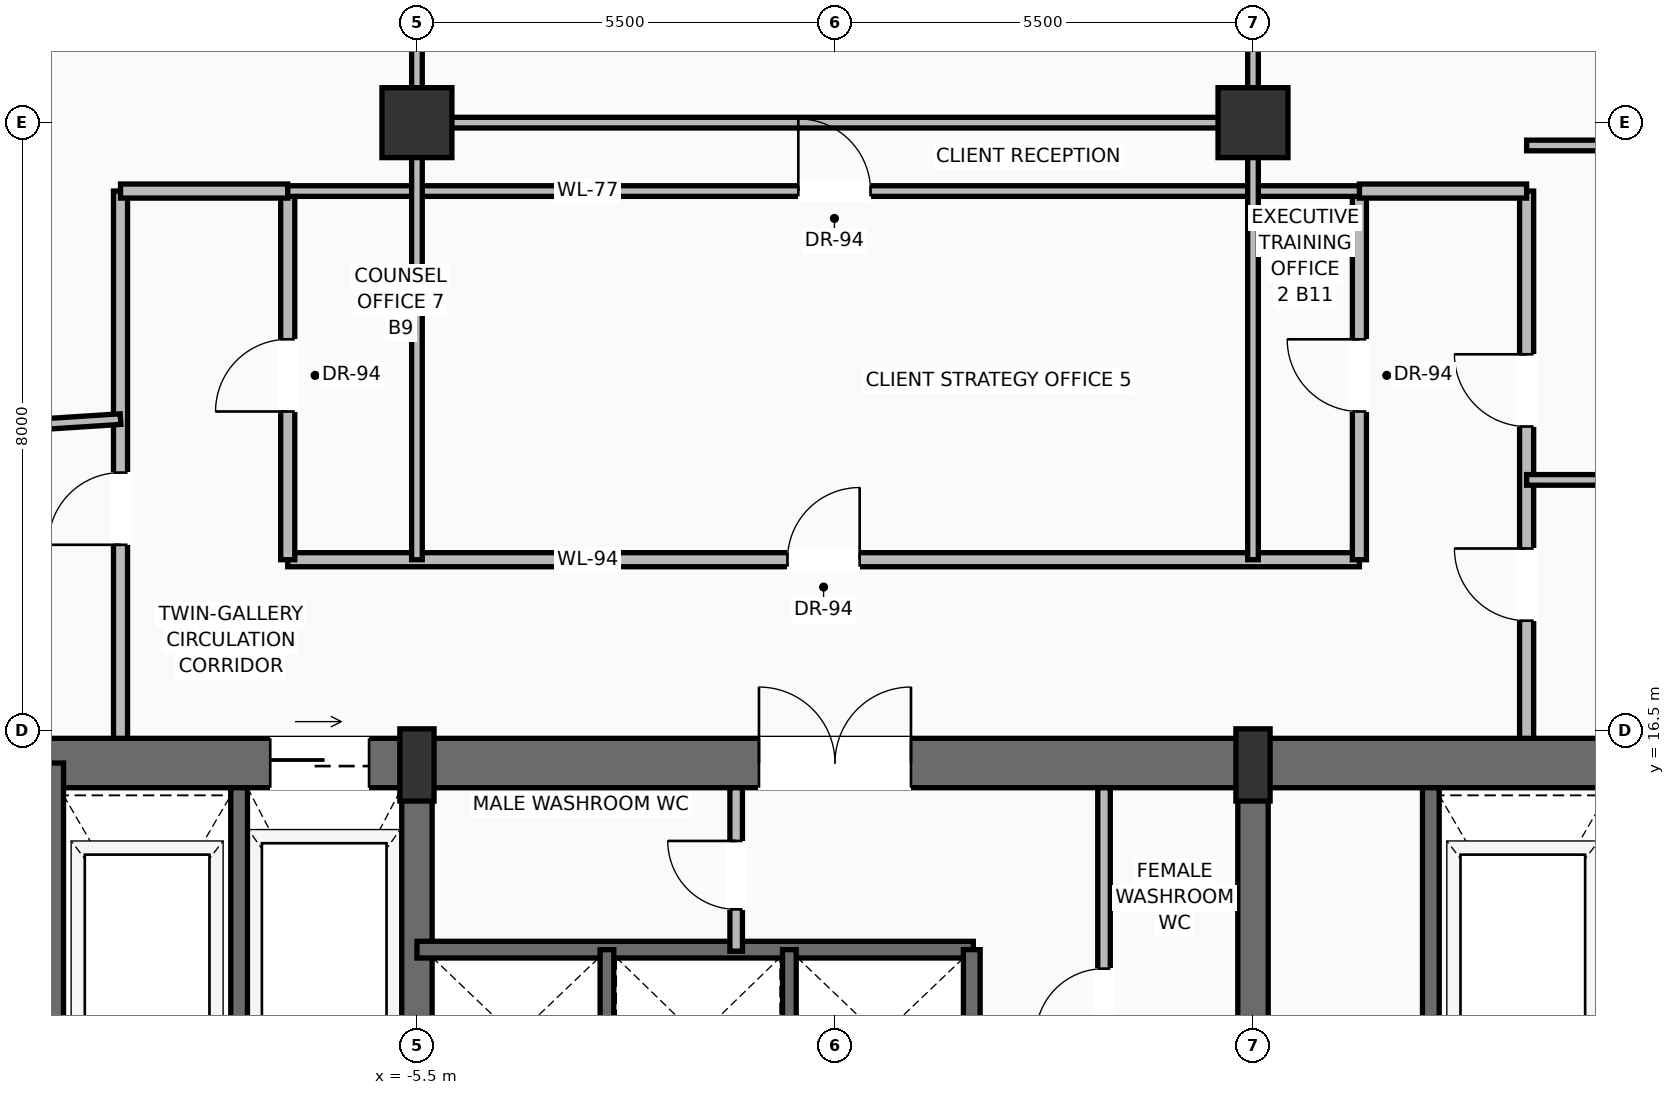
"""IFC4 building model, lengths in metres.
Left out: names, types, materials, properties, quantities, classifications, styles, units other than length and angle.
Written with IfcOpenShell. Run it as: python <this file> out.ifc"""

import sys

from ifc_helpers import new_model, si_unit, direction, frame, frame_2d, origin, origin_2d, place, context, subcontext, project, spatial, rectangle, extrude, source, transform, mapped, element, fill, save


model = new_model("IFC4")
c1 = context("Model", 3, precision=1e-05, world=origin(), true_north=direction((0.0, 1.0)))
c2 = subcontext(c1, "Body", "Model", "MODEL_VIEW")
j1 = project(units=[si_unit("LENGTHUNIT", "METRE"), si_unit("PLANEANGLEUNIT", "RADIAN")], contexts=[c1])
p1 = place(None, origin())
s1 = spatial("IfcSite", under=j1, at=p1, CompositionType="ELEMENT")
p2 = place(p1, origin())
s2 = spatial("IfcBuilding", under=s1, at=p2, CompositionType="ELEMENT")
p3 = place(p2, frame((0.0, 0.0, 144.1)))
s3 = spatial("IfcBuildingStorey", under=s2, at=p3, CompositionType="ELEMENT", Elevation=144.1)
p4 = place(p3, frame((-10.8, 16.075, 0.0), z_axis=(0.0, 0.0, 1.0), x_axis=(1.0, 0.0, 0.0)))
e1 = element("IfcWall", 1, at=p4, inside=s3, PredefinedType="SHEAR", context=c2, shape_type="SweptSolid", body=[
    extrude(rectangle(XDim=21.6, YDim=0.65, at=frame_2d((10.8, 0.0))), origin(), (0.0, 0.0, 1.0), 3.47),
])
p5 = place(p4, frame((3.37, 0.0, 0.0)))
e2 = element("IfcOpeningElement", 2, at=p5, cuts=e1, PredefinedType="OPENING", context=c2, shape_type="SweptSolid", body=[
    extrude(rectangle(XDim=1.3, YDim=2.3, at=frame_2d((0.65, 1.15))), frame((0.0, 0.335, 0.0), z_axis=(0.0, -1.0, 0.0), x_axis=(1.0, 0.0, 0.0)), (0.0, 0.0, 1.0), 0.67),
])
p6 = place(p4, frame((9.8, 0.0, 0.0)))
e3 = element("IfcOpeningElement", 3, at=p6, cuts=e1, PredefinedType="OPENING", context=c2, shape_type="SweptSolid", body=[
    extrude(rectangle(XDim=2.0, YDim=2.4, at=frame_2d((1.0, 1.2))), frame((0.0, 0.335, 0.0), z_axis=(0.0, -1.0, 0.0), x_axis=(1.0, 0.0, 0.0)), (0.0, 0.0, 1.0), 0.67),
])
p7 = place(p3, frame((-10.475, 0.525, 0.0), z_axis=(0.0, 0.0, 1.0), x_axis=(0.0, 1.0, 0.0)))
e4 = element("IfcWall", 4, at=p7, inside=s3, PredefinedType="SHEAR", context=c2, shape_type="SweptSolid", body=[
    extrude(rectangle(XDim=15.55, YDim=0.65, at=frame_2d((7.775, 0.0))), origin(), (0.0, 0.0, 1.0), 3.47),
])
p8 = place(p3, frame((-5.5, 0.525, 0.0), z_axis=(0.0, 0.0, 1.0), x_axis=(0.0, 1.0, 0.0)))
e5 = element("IfcWall", 5, at=p8, inside=s3, PredefinedType="SHEAR", context=c2, shape_type="SweptSolid", body=[
    extrude(rectangle(XDim=15.55, YDim=0.4, at=frame_2d((7.775, 0.0))), origin(), (0.0, 0.0, 1.0), 3.47),
])
p9 = place(p8, frame((8.975, 0.0, 0.0)))
e6 = element("IfcOpeningElement", 6, at=p9, cuts=e5, PredefinedType="OPENING", context=c2, shape_type="SweptSolid", body=[
    extrude(rectangle(XDim=1.1, YDim=2.2, at=frame_2d((0.55, 1.1))), frame((0.0, 0.21, 0.0), z_axis=(0.0, -1.0, 0.0), x_axis=(1.0, 0.0, 0.0)), (0.0, 0.0, 1.0), 0.42),
])
p10 = place(p3, frame((5.5, 0.525, 0.0), z_axis=(0.0, 0.0, 1.0), x_axis=(0.0, 1.0, 0.0)))
e7 = element("IfcWall", 7, at=p10, inside=s3, PredefinedType="SHEAR", context=c2, shape_type="SweptSolid", body=[
    extrude(rectangle(XDim=15.55, YDim=0.4, at=frame_2d((7.775, 0.0))), origin(), (0.0, 0.0, 1.0), 3.47),
])
p11 = place(p10, frame((8.975, 0.0, 0.0)))
e8 = element("IfcOpeningElement", 8, at=p11, cuts=e7, PredefinedType="OPENING", context=c2, shape_type="SweptSolid", body=[
    extrude(rectangle(XDim=1.1, YDim=2.2, at=frame_2d((0.55, 1.1))), frame((0.0, 0.21, 0.0), z_axis=(0.0, -1.0, 0.0), x_axis=(1.0, 0.0, 0.0)), (0.0, 0.0, 1.0), 0.42),
])
m1 = source(origin(), c2, "Body", "SweptSolid", [
    extrude(rectangle(XDim=0.45, YDim=0.95, at=origin_2d()), origin(), (0.0, 0.0, 1.0), 3.7),
])
for number, where, z_axis, x_axis in (
    (9, (-5.5, 16.05, 0.0), (0.0, 0.0, 1.0), (1.0, 0.0, 0.0)),
    (10, (5.5, 16.05, 0.0), (0.0, 0.0, 1.0), (1.0, 0.0, 0.0)),
):
    element("IfcColumn", number, at=place(p3, frame(where, z_axis=z_axis, x_axis=x_axis)), inside=s3, PredefinedType="PILASTER", context=c2, shape_type="MappedRepresentation", body=[
        mapped(m1, transform((0.0, 0.0, 0.0), scale=1.0)),
    ])
m2 = source(origin(), c2, "Body", "SweptSolid", [
    extrude(rectangle(XDim=0.92, YDim=0.92, at=origin_2d()), origin(), (0.0, 0.0, 1.0), 3.7),
])
for number, where, z_axis, x_axis in (
    (11, (-5.5, 24.5, 0.0), (0.0, 0.0, 1.0), (1.0, 0.0, 0.0)),
    (12, (5.5, 24.5, 0.0), (0.0, 0.0, 1.0), (1.0, 0.0, 0.0)),
):
    element("IfcColumn", number, at=place(p3, frame(where, z_axis=z_axis, x_axis=x_axis)), inside=s3, PredefinedType="COLUMN", context=c2, shape_type="MappedRepresentation", body=[
        mapped(m2, transform((0.0, 0.0, 0.0), scale=1.0)),
    ])
for number, where, z_axis, x_axis in (
    (13, (-7.84, 11.87, 0.0), (0.0, 0.0, 1.0), (0.0, 1.0, 0.0)),
    (14, (7.84, 11.87, 0.0), (0.0, 0.0, 1.0), (0.0, 1.0, 0.0)),
):
    element("IfcWall", number, at=place(p3, frame(where, z_axis=z_axis, x_axis=x_axis)), inside=s3, PredefinedType="SOLIDWALL", context=c2, shape_type="SweptSolid", body=[
        extrude(rectangle(XDim=3.88, YDim=0.22, at=frame_2d((1.94, 0.0))), origin(), (0.0, 0.0, 1.0), 3.47),
    ])
p12 = place(p3, frame((-5.5, 13.62, 0.0), z_axis=(0.0, 0.0, 1.0), x_axis=(1.0, 0.0, 0.0)))
e15 = element("IfcWall", 15, at=p12, inside=s3, PredefinedType="SOLIDWALL", context=c2, shape_type="SweptSolid", body=[
    extrude(rectangle(XDim=7.32, YDim=0.22, at=frame_2d((3.66, 0.0))), origin(), (0.0, 0.0, 1.0), 3.47),
])
p13 = place(p3, frame((1.8, 11.32, 0.0), z_axis=(0.0, 0.0, 1.0), x_axis=(0.0, 1.0, 0.0)))
e16 = element("IfcWall", 16, at=p13, inside=s3, PredefinedType="SOLIDWALL", context=c2, shape_type="SweptSolid", body=[
    extrude(rectangle(XDim=2.3, YDim=0.22, at=frame_2d((1.15, 0.0))), origin(), (0.0, 0.0, 1.0), 3.47),
])
for number, where, z_axis, x_axis in (
    (17, (-3.0, 11.32, 0.0), (0.0, 0.0, 1.0), (0.0, 1.0, 0.0)),
    (18, (-0.6, 11.32, 0.0), (0.0, 0.0, 1.0), (0.0, 1.0, 0.0)),
):
    element("IfcWall", number, at=place(p3, frame(where, z_axis=z_axis, x_axis=x_axis)), inside=s3, PredefinedType="SOLIDWALL", context=c2, shape_type="SweptSolid", body=[
        extrude(rectangle(XDim=2.3, YDim=0.18, at=frame_2d((1.15, 0.0))), origin(), (0.0, 0.0, 1.0), 3.47),
    ])
p14 = place(p3, frame((-1.3, 13.6, 0.0), z_axis=(0.0, 0.0, 1.0), x_axis=(0.0, 1.0, 0.0)))
e19 = element("IfcWall", 19, at=p14, inside=s3, PredefinedType="PARTITIONING", context=c2, shape_type="SweptSolid", body=[
    extrude(rectangle(XDim=2.15, YDim=0.165, at=frame_2d((1.075, 0.0))), origin(), (0.0, 0.0, 1.0), 3.462),
])
p15 = place(p14, frame((0.55, 0.0, 0.0)))
e20 = element("IfcOpeningElement", 20, at=p15, cuts=e19, PredefinedType="OPENING", context=c2, shape_type="SweptSolid", body=[
    extrude(rectangle(XDim=0.9, YDim=2.1, at=frame_2d((0.45, 1.05))), frame((0.0, 0.093, 0.0), z_axis=(0.0, -1.0, 0.0), x_axis=(1.0, 0.0, 0.0)), (0.0, 0.0, 1.0), 0.185),
])
p16 = place(p3, frame((3.54, 11.22, 0.0), z_axis=(0.0, 0.0, 1.0), x_axis=(0.0, 1.0, 0.0)))
e21 = element("IfcWall", 21, at=p16, inside=s3, PredefinedType="PARTITIONING", context=c2, shape_type="SweptSolid", body=[
    extrude(rectangle(XDim=4.53, YDim=0.165, at=frame_2d((2.265, 0.0))), origin(), (0.0, 0.0, 1.0), 3.462),
])
p17 = place(p16, frame((1.25, 0.0, 0.0)))
e22 = element("IfcOpeningElement", 22, at=p17, cuts=e21, PredefinedType="OPENING", context=c2, shape_type="SweptSolid", body=[
    extrude(rectangle(XDim=0.9, YDim=2.1, at=frame_2d((0.45, 1.05))), frame((0.0, 0.093, 0.0), z_axis=(0.0, -1.0, 0.0), x_axis=(1.0, 0.0, 0.0)), (0.0, 0.0, 1.0), 0.185),
])
p18 = place(p3, frame((-7.2, 18.75, 0.0), z_axis=(0.0, 0.0, 1.0), x_axis=(1.0, 0.0, 0.0)))
e23 = element("IfcWall", 23, at=p18, inside=s3, PredefinedType="PARTITIONING", context=c2, shape_type="SweptSolid", body=[
    extrude(rectangle(XDim=14.1, YDim=0.185, at=frame_2d((7.05, 0.0))), origin(), (0.0, 0.0, 1.0), 2.846),
])
p19 = place(p18, frame((6.575, 0.0, 0.0)))
e24 = element("IfcOpeningElement", 24, at=p19, cuts=e23, PredefinedType="OPENING", context=c2, shape_type="SweptSolid", body=[
    extrude(rectangle(XDim=0.95, YDim=2.2, at=frame_2d((0.475, 1.1))), frame((0.0, 0.103, 0.0), z_axis=(0.0, -1.0, 0.0), x_axis=(1.0, 0.0, 0.0)), (0.0, 0.0, 1.0), 0.205),
])
p20 = place(p3, frame((-7.2, 18.75, 0.0), z_axis=(0.0, 0.0, 1.0), x_axis=(0.0, 1.0, 0.0)))
e25 = element("IfcWall", 25, at=p20, inside=s3, PredefinedType="PARTITIONING", context=c2, shape_type="SweptSolid", body=[
    extrude(rectangle(XDim=4.85, YDim=0.185, at=frame_2d((2.425, 0.0))), origin(), (0.0, 0.0, 1.0), 3.462),
])
p21 = place(p20, frame((1.95, 0.0, 0.0)))
e26 = element("IfcOpeningElement", 26, at=p21, cuts=e25, PredefinedType="OPENING", context=c2, shape_type="SweptSolid", body=[
    extrude(rectangle(XDim=0.95, YDim=2.2, at=frame_2d((0.475, 1.1))), frame((0.0, 0.103, 0.0), z_axis=(0.0, -1.0, 0.0), x_axis=(1.0, 0.0, 0.0)), (0.0, 0.0, 1.0), 0.205),
])
p22 = place(p3, frame((6.9, 18.75, 0.0), z_axis=(0.0, 0.0, 1.0), x_axis=(0.0, 1.0, 0.0)))
e27 = element("IfcWall", 27, at=p22, inside=s3, PredefinedType="PARTITIONING", context=c2, shape_type="SweptSolid", body=[
    extrude(rectangle(XDim=4.85, YDim=0.185, at=frame_2d((2.425, 0.0))), origin(), (0.0, 0.0, 1.0), 3.462),
])
p23 = place(p22, frame((1.95, 0.0, 0.0)))
e28 = element("IfcOpeningElement", 28, at=p23, cuts=e27, PredefinedType="OPENING", context=c2, shape_type="SweptSolid", body=[
    extrude(rectangle(XDim=0.95, YDim=2.2, at=frame_2d((0.475, 1.1))), frame((0.0, 0.103, 0.0), z_axis=(0.0, -1.0, 0.0), x_axis=(1.0, 0.0, 0.0)), (0.0, 0.0, 1.0), 0.205),
])
p24 = place(p3, frame((-9.4, 16.4, 0.0), z_axis=(0.0, 0.0, 1.0), x_axis=(0.0, 1.0, 0.0)))
e29 = element("IfcWall", 29, at=p24, inside=s3, PredefinedType="PARTITIONING", context=c2, shape_type="SweptSolid", body=[
    extrude(rectangle(XDim=7.2, YDim=0.185, at=frame_2d((3.6, 0.0))), origin(), (0.0, 0.0, 1.0), 3.462),
])
p25 = place(p24, frame((2.546, 0.0, 0.0)))
e30 = element("IfcOpeningElement", 30, at=p25, cuts=e29, PredefinedType="OPENING", context=c2, shape_type="SweptSolid", body=[
    extrude(rectangle(XDim=0.95, YDim=2.2, at=frame_2d((0.475, 1.1))), frame((0.0, 0.103, 0.0), z_axis=(0.0, -1.0, 0.0), x_axis=(1.0, 0.0, 0.0)), (0.0, 0.0, 1.0), 0.205),
])
p26 = place(p3, frame((9.1, 16.4, 0.0), z_axis=(0.0, 0.0, 1.0), x_axis=(0.0, 1.0, 0.0)))
e31 = element("IfcWall", 31, at=p26, inside=s3, PredefinedType="PARTITIONING", context=c2, shape_type="SweptSolid", body=[
    extrude(rectangle(XDim=7.2, YDim=0.185, at=frame_2d((3.6, 0.0))), origin(), (0.0, 0.0, 1.0), 3.462),
])
p27 = place(p26, frame((4.103, 0.0, 0.0)))
e32 = element("IfcOpeningElement", 32, at=p27, cuts=e31, PredefinedType="OPENING", context=c2, shape_type="SweptSolid", body=[
    extrude(rectangle(XDim=0.95, YDim=2.2, at=frame_2d((0.475, 1.1))), frame((0.0, 0.103, 0.0), z_axis=(0.0, -1.0, 0.0), x_axis=(1.0, 0.0, 0.0)), (0.0, 0.0, 1.0), 0.205),
])
p28 = place(p26, frame((1.548, 0.0, 0.0)))
e33 = element("IfcOpeningElement", 33, at=p28, cuts=e31, PredefinedType="OPENING", context=c2, shape_type="SweptSolid", body=[
    extrude(rectangle(XDim=0.95, YDim=2.2, at=frame_2d((0.475, 1.1))), frame((0.0, 0.103, 0.0), z_axis=(0.0, -1.0, 0.0), x_axis=(1.0, 0.0, 0.0)), (0.0, 0.0, 1.0), 0.205),
])
p29 = place(p3, frame((-9.4, 23.6, 0.0), z_axis=(0.0, 0.0, 1.0), x_axis=(1.0, 0.0, 0.0)))
e34 = element("IfcWall", 34, at=p29, inside=s3, PredefinedType="PARTITIONING", context=c2, shape_type="SweptSolid", body=[
    extrude(rectangle(XDim=2.2, YDim=0.185, at=frame_2d((1.1, 0.0))), origin(), (0.0, 0.0, 1.0), 3.462),
])
p30 = place(p3, frame((6.9, 23.6, 0.0), z_axis=(0.0, 0.0, 1.0), x_axis=(1.0, 0.0, 0.0)))
e35 = element("IfcWall", 35, at=p30, inside=s3, PredefinedType="PARTITIONING", context=c2, shape_type="SweptSolid", body=[
    extrude(rectangle(XDim=2.2, YDim=0.185, at=frame_2d((1.1, 0.0))), origin(), (0.0, 0.0, 1.0), 3.462),
])
p31 = place(p3, frame((-7.2, 23.6, 0.0), z_axis=(0.0, 0.0, 1.0), x_axis=(1.0, 0.0, 0.0)))
e36 = element("IfcWall", 36, at=p31, inside=s3, PredefinedType="PARTITIONING", context=c2, shape_type="SweptSolid", body=[
    extrude(rectangle(XDim=14.1, YDim=0.14, at=frame_2d((7.05, 0.0))), origin(), (0.0, 0.0, 1.0), 3.462),
])
p32 = place(p31, frame((6.718, 0.0, 0.0)))
e37 = element("IfcOpeningElement", 37, at=p32, cuts=e36, PredefinedType="OPENING", context=c2, shape_type="SweptSolid", body=[
    extrude(rectangle(XDim=0.95, YDim=2.2, at=frame_2d((0.475, 1.1))), frame((0.0, 0.08, 0.0), z_axis=(0.0, -1.0, 0.0), x_axis=(1.0, 0.0, 0.0)), (0.0, 0.0, 1.0), 0.16),
])
for number, where, z_axis, x_axis in (
    (38, (-5.5, 18.75, 0.0), (0.0, 0.0, 1.0), (0.0, 1.0, 0.0)),
    (39, (5.5, 18.75, 0.0), (0.0, 0.0, 1.0), (0.0, 1.0, 0.0)),
):
    element("IfcWall", number, at=place(p3, frame(where, z_axis=z_axis, x_axis=x_axis)), inside=s3, PredefinedType="PARTITIONING", context=c2, shape_type="SweptSolid", body=[
        extrude(rectangle(XDim=13.75, YDim=0.14, at=frame_2d((6.875, 0.0))), origin(), (0.0, 0.0, 1.0), 2.846),
    ])
p33 = place(p3, frame((-5.5, 24.5, 0.0), z_axis=(0.0, 0.0, 1.0), x_axis=(1.0, 0.0, 0.0)))
e40 = element("IfcWall", 40, at=p33, inside=s3, PredefinedType="PARTITIONING", context=c2, shape_type="SweptSolid", body=[
    extrude(rectangle(XDim=11.0, YDim=0.14, at=frame_2d((5.5, 0.0))), origin(), (0.0, 0.0, 1.0), 2.846),
])
p34 = place(p3, frame((-19.234, 19.962, 0.0), z_axis=(0.0, 0.0, 1.0), x_axis=(0.997901003893, 0.064757906313, 0.0)))
e41 = element("IfcWall", 41, at=p34, inside=s3, PredefinedType="PARTITIONING", context=c2, shape_type="SweptSolid", body=[
    extrude(rectangle(XDim=9.855, YDim=0.14, at=frame_2d((4.927, 0.0))), origin(), (0.0, 0.0, 1.0), 3.462),
])
p35 = place(p3, frame((9.1, 19.8, 0.0), z_axis=(0.0, 0.0, 1.0), x_axis=(1.0, 0.0, 0.0)))
e42 = element("IfcWall", 42, at=p35, inside=s3, PredefinedType="PARTITIONING", context=c2, shape_type="SweptSolid", body=[
    extrude(rectangle(XDim=10.467, YDim=0.14, at=frame_2d((5.233, 0.0))), origin(), (0.0, 0.0, 1.0), 3.462),
])
p36 = place(p3, frame((9.1, 24.2, 0.0), z_axis=(0.0, 0.0, 1.0), x_axis=(1.0, 0.0, 0.0)))
e43 = element("IfcWall", 43, at=p36, inside=s3, PredefinedType="PARTITIONING", context=c2, shape_type="SweptSolid", body=[
    extrude(rectangle(XDim=7.665, YDim=0.14, at=frame_2d((3.832, 0.0))), origin(), (0.0, 0.0, 1.0), 3.462),
])
m3 = source(origin(), c2, "Body", "SweptSolid", [
    extrude(rectangle(XDim=1.3, YDim=2.3, at=frame_2d((0.65, 1.15))), frame((0.0, 0.025, 0.0), z_axis=(0.0, -1.0, 0.0), x_axis=(1.0, 0.0, 0.0)), (0.0, 0.0, 1.0), 0.05),
])
p37 = place(p5, origin())
e44 = element("IfcDoor", 44, at=p37, inside=s3, OperationType="SLIDING_TO_RIGHT", PredefinedType="DOOR", context=c2, shape_type="MappedRepresentation", body=[
    mapped(m3, transform((0.0, 0.0, 0.0), scale=1.0)),
])
fill(e2, e44)
m4 = source(origin(), c2, "Body", "SweptSolid", [
    extrude(rectangle(XDim=2.0, YDim=2.4, at=frame_2d((1.0, 1.2))), frame((0.0, 0.025, 0.0), z_axis=(0.0, -1.0, 0.0), x_axis=(1.0, 0.0, 0.0)), (0.0, 0.0, 1.0), 0.05),
])
p38 = place(p6, origin())
e45 = element("IfcDoor", 45, at=p38, inside=s3, OperationType="DOUBLE_DOOR_SINGLE_SWING", PredefinedType="DOOR", context=c2, shape_type="MappedRepresentation", body=[
    mapped(m4, transform((0.0, 0.0, 0.0), scale=1.0)),
])
fill(e3, e45)
m5 = source(origin(), c2, "Body", "SweptSolid", [
    extrude(rectangle(XDim=0.9, YDim=2.1, at=frame_2d((0.45, 1.05))), frame((0.0, 0.025, 0.0), z_axis=(0.0, -1.0, 0.0), x_axis=(1.0, 0.0, 0.0)), (0.0, 0.0, 1.0), 0.05),
])
p39 = place(p15, origin())
e46 = element("IfcDoor", 46, at=p39, inside=s3, OperationType="SINGLE_SWING_RIGHT", PredefinedType="DOOR", context=c2, shape_type="MappedRepresentation", body=[
    mapped(m5, transform((0.0, 0.0, 0.0), scale=1.0)),
])
fill(e20, e46)
p40 = place(p17, origin())
e47 = element("IfcDoor", 47, at=p40, inside=s3, OperationType="SINGLE_SWING_LEFT", PredefinedType="DOOR", context=c2, shape_type="MappedRepresentation", body=[
    mapped(m5, transform((0.0, 0.0, 0.0), scale=1.0)),
])
fill(e22, e47)
m6 = source(origin(), c2, "Body", "SweptSolid", [
    extrude(rectangle(XDim=0.95, YDim=2.2, at=frame_2d((0.475, 1.1))), frame((0.0, 0.025, 0.0), z_axis=(0.0, -1.0, 0.0), x_axis=(1.0, 0.0, 0.0)), (0.0, 0.0, 1.0), 0.05),
])
p41 = place(p19, origin())
e48 = element("IfcDoor", 48, at=p41, inside=s3, OperationType="SINGLE_SWING_RIGHT", PredefinedType="DOOR", context=c2, shape_type="MappedRepresentation", body=[
    mapped(m6, transform((0.0, 0.0, 0.0), scale=1.0)),
])
fill(e24, e48)
p42 = place(p25, origin())
e49 = element("IfcDoor", 49, at=p42, inside=s3, OperationType="SINGLE_SWING_LEFT", PredefinedType="DOOR", context=c2, shape_type="MappedRepresentation", body=[
    mapped(m6, transform((0.0, 0.0, 0.0), scale=1.0)),
])
fill(e30, e49)
p43 = place(p27, origin())
e50 = element("IfcDoor", 50, at=p43, inside=s3, OperationType="SINGLE_SWING_RIGHT", PredefinedType="DOOR", context=c2, shape_type="MappedRepresentation", body=[
    mapped(m6, transform((0.0, 0.0, 0.0), scale=1.0)),
])
fill(e32, e50)
p44 = place(p28, origin())
e51 = element("IfcDoor", 51, at=p44, inside=s3, OperationType="SINGLE_SWING_RIGHT", PredefinedType="DOOR", context=c2, shape_type="MappedRepresentation", body=[
    mapped(m6, transform((0.0, 0.0, 0.0), scale=1.0)),
])
fill(e33, e51)
p45 = place(p21, origin())
e52 = element("IfcDoor", 52, at=p45, inside=s3, OperationType="SINGLE_SWING_LEFT", PredefinedType="DOOR", context=c2, shape_type="MappedRepresentation", body=[
    mapped(m6, transform((0.0, 0.0, 0.0), scale=1.0)),
])
fill(e26, e52)
p46 = place(p23, origin())
e53 = element("IfcDoor", 53, at=p46, inside=s3, OperationType="SINGLE_SWING_RIGHT", PredefinedType="DOOR", context=c2, shape_type="MappedRepresentation", body=[
    mapped(m6, transform((0.0, 0.0, 0.0), scale=1.0)),
])
fill(e28, e53)
p47 = place(p32, origin())
e54 = element("IfcDoor", 54, at=p47, inside=s3, OperationType="SINGLE_SWING_LEFT", PredefinedType="DOOR", context=c2, shape_type="MappedRepresentation", body=[
    mapped(m6, transform((0.0, 0.0, 0.0), scale=1.0)),
])
fill(e37, e54)
save(model, sys.argv[1])
